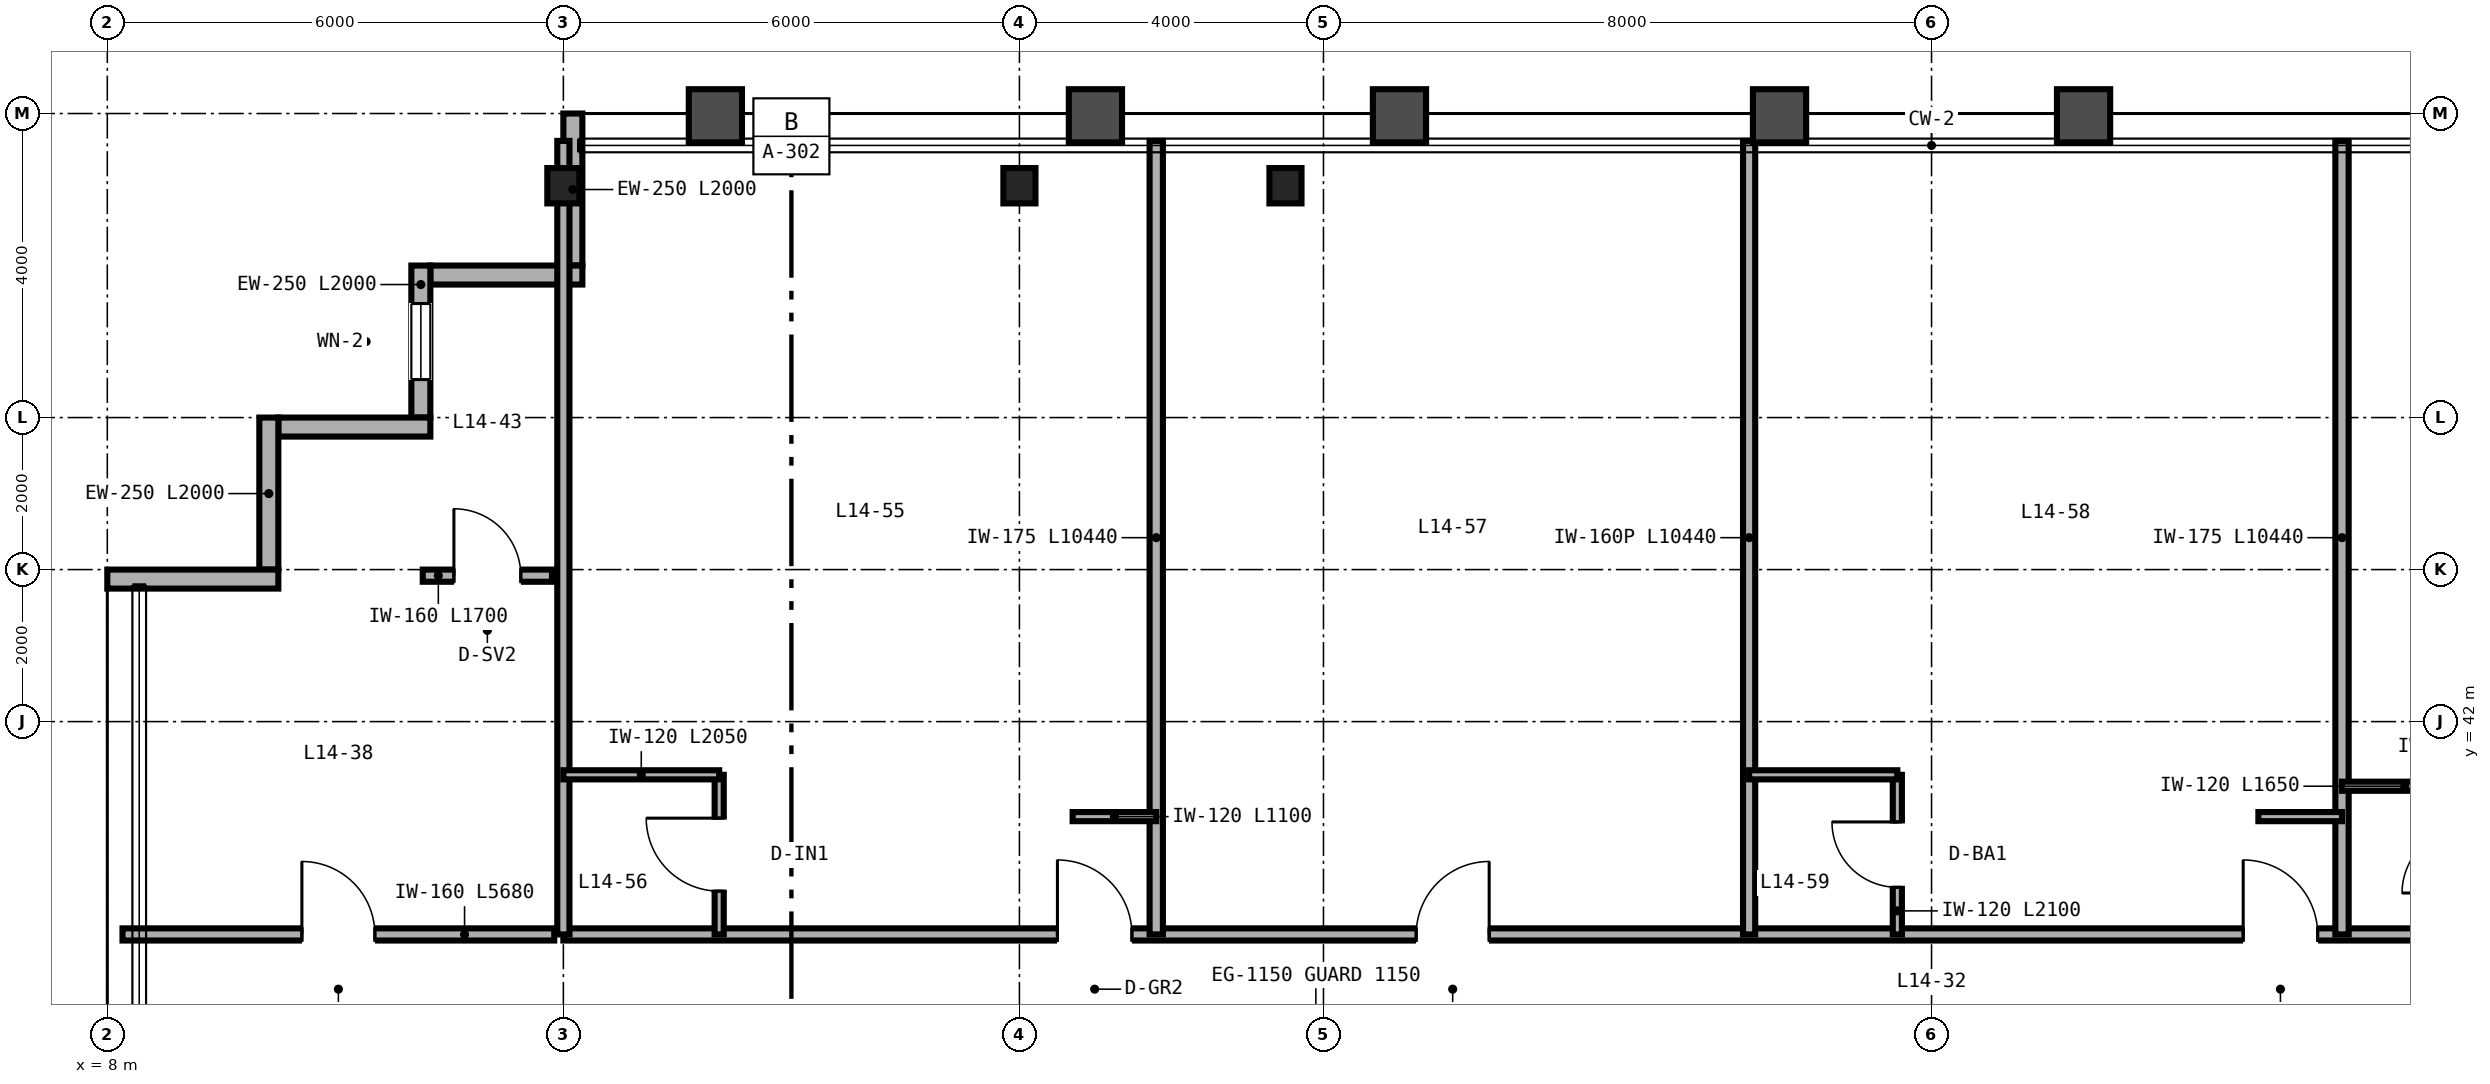
"""IFC4 building model, lengths in metres.
Left out: names, types, materials, properties, quantities, classifications, styles, units other than length and angle.
Written with IfcOpenShell. Run it as: python <this file> out.ifc"""

import sys

from ifc_helpers import new_model, si_unit, direction, frame, frame_2d, origin, origin_2d, place, context, subcontext, project, spatial, rectangle, i_section, extrude, source, transform, mapped, element, fill, save


model = new_model("IFC4")
c1 = context("Model", 3, precision=1e-05, world=origin(), true_north=direction((0.0, 1.0)))
c2 = subcontext(c1, "Body", "Model", "MODEL_VIEW")
j1 = project(units=[si_unit("LENGTHUNIT", "METRE"), si_unit("PLANEANGLEUNIT", "RADIAN")], contexts=[c1])
p1 = place(None, origin())
s1 = spatial("IfcSite", under=j1, at=p1, CompositionType="ELEMENT")
p2 = place(p1, origin())
s2 = spatial("IfcBuilding", under=s1, at=p2, CompositionType="ELEMENT")
p3 = place(p2, frame((0.0, 0.0, 60.0)))
s3 = spatial("IfcBuildingStorey", under=s2, at=p3, CompositionType="ELEMENT", Elevation=60.0)
m1 = source(origin(), c2, "Body", "SweptSolid", [
    extrude(i_section(OverallWidth=0.422, OverallDepth=0.465, WebThickness=0.045, FlangeThickness=0.073, FilletRadius=0.025, at=origin_2d()), origin(), (0.0, 0.0, 1.0), 3.35),
])
for number, where, z_axis, x_axis in (
    (1, (14.0, 49.05, 0.0), (0.0, 0.0, 1.0), (1.0, 0.0, 0.0)),
    (2, (20.0, 49.05, 0.0), (0.0, 0.0, 1.0), (1.0, 0.0, 0.0)),
    (3, (23.5, 49.05, 0.0), (0.0, 0.0, 1.0), (1.0, 0.0, 0.0)),
):
    element("IfcColumn", number, at=place(p3, frame(where, z_axis=z_axis, x_axis=x_axis)), inside=s3, PredefinedType="COLUMN", context=c2, shape_type="MappedRepresentation", body=[
        mapped(m1, transform((0.0, 0.0, 0.0), scale=1.0)),
    ])
p4 = place(p3, frame((14.125, 50.0, 0.0), z_axis=(0.0, 0.0, 1.0), x_axis=(0.0, -1.0, 0.0)))
e4 = element("IfcWall", 4, at=p4, inside=s3, PredefinedType="SOLIDWALL", context=c2, shape_type="SweptSolid", body=[
    extrude(rectangle(XDim=2.0, YDim=0.25, at=frame_2d((1.0, 0.0))), origin(), (0.0, 0.0, 1.0), 2.657),
])
p5 = place(p3, frame((14.25, 47.875, 0.0), z_axis=(0.0, 0.0, 1.0), x_axis=(-1.0, 0.0, 0.0)))
e5 = element("IfcWall", 5, at=p5, inside=s3, PredefinedType="SOLIDWALL", context=c2, shape_type="SweptSolid", body=[
    extrude(rectangle(XDim=2.0, YDim=0.25, at=frame_2d((1.0, 0.0))), origin(), (0.0, 0.0, 1.0), 3.35),
])
p6 = place(p3, frame((12.125, 48.0, 0.0), z_axis=(0.0, 0.0, 1.0), x_axis=(0.0, -1.0, 0.0)))
e6 = element("IfcWall", 6, at=p6, inside=s3, PredefinedType="SOLIDWALL", context=c2, shape_type="SweptSolid", body=[
    extrude(rectangle(XDim=2.0, YDim=0.25, at=frame_2d((1.0, 0.0))), origin(), (0.0, 0.0, 1.0), 3.35),
])
p7 = place(p6, frame((0.5, 0.0, 0.85)))
e7 = element("IfcOpeningElement", 7, at=p7, cuts=e6, PredefinedType="OPENING", context=c2, shape_type="SweptSolid", body=[
    extrude(rectangle(XDim=1.0, YDim=1.9, at=frame_2d((0.5, 0.95))), frame((0.0, 0.135, 0.0), z_axis=(0.0, -1.0, 0.0), x_axis=(1.0, 0.0, 0.0)), (0.0, 0.0, 1.0), 0.27),
])
for number, where, z_axis, x_axis in (
    (8, (12.25, 45.875, 0.0), (0.0, 0.0, 1.0), (-1.0, 0.0, 0.0)),
    (9, (10.125, 46.0, 0.0), (0.0, 0.0, 1.0), (0.0, -1.0, 0.0)),
):
    element("IfcWall", number, at=place(p3, frame(where, z_axis=z_axis, x_axis=x_axis)), inside=s3, PredefinedType="SOLIDWALL", context=c2, shape_type="SweptSolid", body=[
        extrude(rectangle(XDim=2.0, YDim=0.25, at=frame_2d((1.0, 0.0))), origin(), (0.0, 0.0, 1.0), 3.35),
    ])
p8 = place(p3, frame((10.25, 43.875, 0.0), z_axis=(0.0, 0.0, 1.0), x_axis=(-1.0, 0.0, 0.0)))
e10 = element("IfcWall", 10, at=p8, inside=s3, PredefinedType="SOLIDWALL", context=c2, shape_type="SweptSolid", body=[
    extrude(rectangle(XDim=2.25, YDim=0.25, at=frame_2d((1.125, 0.0))), origin(), (0.0, 0.0, 1.0), 3.35),
])
p9 = place(p3, frame((8.2, 39.2, 0.0), z_axis=(0.0, 0.0, 1.0), x_axis=(1.0, 0.0, 0.0)))
e11 = element("IfcWall", 11, at=p9, inside=s3, PredefinedType="PARTITIONING", context=c2, shape_type="SweptSolid", body=[
    extrude(rectangle(XDim=5.68, YDim=0.16, at=frame_2d((2.84, 0.0))), origin(), (0.0, 0.0, 1.0), 3.35),
])
p10 = place(p9, frame((2.36, 0.0, 0.0)))
e12 = element("IfcOpeningElement", 12, at=p10, cuts=e11, PredefinedType="OPENING", context=c2, shape_type="SweptSolid", body=[
    extrude(rectangle(XDim=0.96, YDim=2.15, at=frame_2d((0.48, 1.075))), frame((0.0, 0.09, 0.0), z_axis=(0.0, -1.0, 0.0), x_axis=(1.0, 0.0, 0.0)), (0.0, 0.0, 1.0), 0.18),
])
p11 = place(p3, frame((12.15, 43.92, 0.0), z_axis=(0.0, 0.0, 1.0), x_axis=(1.0, 0.0, 0.0)))
e13 = element("IfcWall", 13, at=p11, inside=s3, PredefinedType="PARTITIONING", context=c2, shape_type="SweptSolid", body=[
    extrude(rectangle(XDim=1.7, YDim=0.16, at=frame_2d((0.85, 0.0))), origin(), (0.0, 0.0, 1.0), 3.35),
])
p12 = place(p11, frame((0.41, 0.0, 0.0)))
e14 = element("IfcOpeningElement", 14, at=p12, cuts=e13, PredefinedType="OPENING", context=c2, shape_type="SweptSolid", body=[
    extrude(rectangle(XDim=0.88, YDim=2.15, at=frame_2d((0.44, 1.075))), frame((0.0, 0.09, 0.0), z_axis=(0.0, -1.0, 0.0), x_axis=(1.0, 0.0, 0.0)), (0.0, 0.0, 1.0), 0.18),
])
p13 = place(p3, frame((14.0, 39.2, 0.0), z_axis=(0.0, 0.0, 1.0), x_axis=(1.0, 0.0, 0.0)))
e15 = element("IfcWall", 15, at=p13, inside=s3, PredefinedType="PARTITIONING", context=c2, shape_type="SweptSolid", body=[
    extrude(rectangle(XDim=36.0, YDim=0.16, at=frame_2d((18.0, 0.0))), origin(), (0.0, 0.0, 1.0), 2.571),
])
p14 = place(p13, frame((6.5, 0.0, 0.0)))
e16 = element("IfcOpeningElement", 16, at=p14, cuts=e15, PredefinedType="OPENING", context=c2, shape_type="SweptSolid", body=[
    extrude(rectangle(XDim=0.98, YDim=2.2, at=frame_2d((0.49, 1.1))), frame((0.0, 0.09, 0.0), z_axis=(0.0, -1.0, 0.0), x_axis=(1.0, 0.0, 0.0)), (0.0, 0.0, 1.0), 0.18),
])
p15 = place(p13, frame((11.22, 0.0, 0.0)))
e17 = element("IfcOpeningElement", 17, at=p15, cuts=e15, PredefinedType="OPENING", context=c2, shape_type="SweptSolid", body=[
    extrude(rectangle(XDim=0.96, YDim=2.15, at=frame_2d((0.48, 1.075))), frame((0.0, 0.09, 0.0), z_axis=(0.0, -1.0, 0.0), x_axis=(1.0, 0.0, 0.0)), (0.0, 0.0, 1.0), 0.18),
])
p16 = place(p13, frame((22.1, 0.0, 0.0)))
e18 = element("IfcOpeningElement", 18, at=p16, cuts=e15, PredefinedType="OPENING", context=c2, shape_type="SweptSolid", body=[
    extrude(rectangle(XDim=0.98, YDim=2.2, at=frame_2d((0.49, 1.1))), frame((0.0, 0.09, 0.0), z_axis=(0.0, -1.0, 0.0), x_axis=(1.0, 0.0, 0.0)), (0.0, 0.0, 1.0), 0.18),
])
p17 = place(p13, frame((28.94, 0.0, 0.0)))
e19 = element("IfcOpeningElement", 19, at=p17, cuts=e15, PredefinedType="OPENING", context=c2, shape_type="SweptSolid", body=[
    extrude(rectangle(XDim=0.94, YDim=2.15, at=frame_2d((0.47, 1.075))), frame((0.0, 0.09, 0.0), z_axis=(0.0, -1.0, 0.0), x_axis=(1.0, 0.0, 0.0)), (0.0, 0.0, 1.0), 0.18),
])
p18 = place(p13, frame((34.74, 0.0, 0.0)))
e20 = element("IfcOpeningElement", 20, at=p18, cuts=e15, PredefinedType="OPENING", context=c2, shape_type="SweptSolid", body=[
    extrude(rectangle(XDim=0.94, YDim=2.15, at=frame_2d((0.47, 1.075))), frame((0.0, 0.09, 0.0), z_axis=(0.0, -1.0, 0.0), x_axis=(1.0, 0.0, 0.0)), (0.0, 0.0, 1.0), 0.18),
])
p19 = place(p3, frame((14.0, 39.2, 0.0), z_axis=(0.0, 0.0, 1.0), x_axis=(0.0, 1.0, 0.0)))
e21 = element("IfcWall", 21, at=p19, inside=s3, PredefinedType="PARTITIONING", context=c2, shape_type="SweptSolid", body=[
    extrude(rectangle(XDim=10.44, YDim=0.16, at=frame_2d((5.22, 0.0))), origin(), (0.0, 0.0, 1.0), 2.657),
])
p20 = place(p3, frame((21.8, 39.2, 0.0), z_axis=(0.0, 0.0, 1.0), x_axis=(0.0, 1.0, 0.0)))
e22 = element("IfcWall", 22, at=p20, inside=s3, PredefinedType="PARTITIONING", context=c2, shape_type="SweptSolid", body=[
    extrude(rectangle(XDim=10.44, YDim=0.175, at=frame_2d((5.22, 0.0))), origin(), (0.0, 0.0, 1.0), 2.813),
])
p21 = place(p3, frame((16.05, 39.2, 0.0), z_axis=(0.0, 0.0, 1.0), x_axis=(0.0, 1.0, 0.0)))
e23 = element("IfcWall", 23, at=p21, inside=s3, PredefinedType="PARTITIONING", context=c2, shape_type="SweptSolid", body=[
    extrude(rectangle(XDim=2.1, YDim=0.12, at=frame_2d((1.05, 0.0))), origin(), (0.0, 0.0, 1.0), 3.35),
])
p22 = place(p21, frame((0.57, 0.0, 0.0)))
e24 = element("IfcOpeningElement", 24, at=p22, cuts=e23, PredefinedType="OPENING", context=c2, shape_type="SweptSolid", body=[
    extrude(rectangle(XDim=0.96, YDim=2.15, at=frame_2d((0.48, 1.075))), frame((0.0, 0.07, 0.0), z_axis=(0.0, -1.0, 0.0), x_axis=(1.0, 0.0, 0.0)), (0.0, 0.0, 1.0), 0.14),
])
p23 = place(p3, frame((14.0, 41.3, 0.0), z_axis=(0.0, 0.0, 1.0), x_axis=(1.0, 0.0, 0.0)))
e25 = element("IfcWall", 25, at=p23, inside=s3, PredefinedType="PARTITIONING", context=c2, shape_type="SweptSolid", body=[
    extrude(rectangle(XDim=2.05, YDim=0.12, at=frame_2d((1.025, 0.0))), origin(), (0.0, 0.0, 1.0), 3.35),
])
p24 = place(p3, frame((20.7, 40.75, 0.0), z_axis=(0.0, 0.0, 1.0), x_axis=(1.0, 0.0, 0.0)))
e26 = element("IfcWall", 26, at=p24, inside=s3, PredefinedType="PARTITIONING", context=c2, shape_type="SweptSolid", body=[
    extrude(rectangle(XDim=1.1, YDim=0.12, at=frame_2d((0.55, 0.0))), origin(), (0.0, 0.0, 1.0), 3.35),
])
p25 = place(p3, frame((29.6, 39.2, 0.0), z_axis=(0.0, 0.0, 1.0), x_axis=(0.0, 1.0, 0.0)))
e27 = element("IfcWall", 27, at=p25, inside=s3, PredefinedType="PARTITIONING", context=c2, shape_type="SweptSolid", body=[
    extrude(rectangle(XDim=10.44, YDim=0.16, at=frame_2d((5.22, 0.0))), origin(), (0.0, 0.0, 1.0), 2.423),
])
p26 = place(p3, frame((37.4, 39.2, 0.0), z_axis=(0.0, 0.0, 1.0), x_axis=(0.0, 1.0, 0.0)))
e28 = element("IfcWall", 28, at=p26, inside=s3, PredefinedType="PARTITIONING", context=c2, shape_type="SweptSolid", body=[
    extrude(rectangle(XDim=10.44, YDim=0.175, at=frame_2d((5.22, 0.0))), origin(), (0.0, 0.0, 1.0), 2.423),
])
p27 = place(p3, frame((31.55, 39.2, 0.0), z_axis=(0.0, 0.0, 1.0), x_axis=(0.0, 1.0, 0.0)))
e29 = element("IfcWall", 29, at=p27, inside=s3, PredefinedType="PARTITIONING", context=c2, shape_type="SweptSolid", body=[
    extrude(rectangle(XDim=2.1, YDim=0.12, at=frame_2d((1.05, 0.0))), origin(), (0.0, 0.0, 1.0), 3.35),
])
p28 = place(p27, frame((0.62, 0.0, 0.0)))
e30 = element("IfcOpeningElement", 30, at=p28, cuts=e29, PredefinedType="OPENING", context=c2, shape_type="SweptSolid", body=[
    extrude(rectangle(XDim=0.86, YDim=2.1, at=frame_2d((0.43, 1.05))), frame((0.0, 0.07, 0.0), z_axis=(0.0, -1.0, 0.0), x_axis=(1.0, 0.0, 0.0)), (0.0, 0.0, 1.0), 0.14),
])
p29 = place(p3, frame((29.6, 41.3, 0.0), z_axis=(0.0, 0.0, 1.0), x_axis=(1.0, 0.0, 0.0)))
e31 = element("IfcWall", 31, at=p29, inside=s3, PredefinedType="PARTITIONING", context=c2, shape_type="SweptSolid", body=[
    extrude(rectangle(XDim=1.95, YDim=0.12, at=frame_2d((0.975, 0.0))), origin(), (0.0, 0.0, 1.0), 3.35),
])
p30 = place(p3, frame((36.3, 40.75, 0.0), z_axis=(0.0, 0.0, 1.0), x_axis=(1.0, 0.0, 0.0)))
e32 = element("IfcWall", 32, at=p30, inside=s3, PredefinedType="PARTITIONING", context=c2, shape_type="SweptSolid", body=[
    extrude(rectangle(XDim=1.1, YDim=0.12, at=frame_2d((0.55, 0.0))), origin(), (0.0, 0.0, 1.0), 3.35),
])
p31 = place(p3, frame((37.4, 41.15, 0.0), z_axis=(0.0, 0.0, 1.0), x_axis=(1.0, 0.0, 0.0)))
e33 = element("IfcWall", 33, at=p31, inside=s3, PredefinedType="PARTITIONING", context=c2, shape_type="SweptSolid", body=[
    extrude(rectangle(XDim=1.65, YDim=0.12, at=frame_2d((0.825, 0.0))), origin(), (0.0, 0.0, 1.0), 3.35),
])
m2 = source(origin(), c2, "Body", "SweptSolid", [
    extrude(rectangle(XDim=1.0, YDim=1.9, at=frame_2d((0.5, 0.95))), frame((0.0, 0.03, 0.0), z_axis=(0.0, -1.0, 0.0), x_axis=(1.0, 0.0, 0.0)), (0.0, 0.0, 1.0), 0.06),
])
p32 = place(p7, origin())
e34 = element("IfcWindow", 34, at=p32, inside=s3, PartitioningType="SINGLE_PANEL", PredefinedType="WINDOW", context=c2, shape_type="MappedRepresentation", body=[
    mapped(m2, transform((0.0, 0.0, 0.0), scale=1.0)),
])
fill(e7, e34)
m3 = source(origin(), c2, "Body", "SweptSolid", [
    extrude(rectangle(XDim=0.96, YDim=2.15, at=frame_2d((0.48, 1.075))), frame((0.0, 0.025, 0.0), z_axis=(0.0, -1.0, 0.0), x_axis=(1.0, 0.0, 0.0)), (0.0, 0.0, 1.0), 0.05),
])
p33 = place(p10, origin())
e35 = element("IfcDoor", 35, at=p33, inside=s3, OperationType="SINGLE_SWING_LEFT", PredefinedType="DOOR", context=c2, shape_type="MappedRepresentation", body=[
    mapped(m3, transform((0.0, 0.0, 0.0), scale=1.0)),
])
fill(e12, e35)
m4 = source(origin(), c2, "Body", "SweptSolid", [
    extrude(rectangle(XDim=0.88, YDim=2.15, at=frame_2d((0.44, 1.075))), frame((0.0, 0.025, 0.0), z_axis=(0.0, -1.0, 0.0), x_axis=(1.0, 0.0, 0.0)), (0.0, 0.0, 1.0), 0.05),
])
p34 = place(p12, origin())
e36 = element("IfcDoor", 36, at=p34, inside=s3, OperationType="SINGLE_SWING_LEFT", PredefinedType="DOOR", context=c2, shape_type="MappedRepresentation", body=[
    mapped(m4, transform((0.0, 0.0, 0.0), scale=1.0)),
])
fill(e14, e36)
p35 = place(p22, origin())
e37 = element("IfcDoor", 37, at=p35, inside=s3, OperationType="SINGLE_SWING_RIGHT", PredefinedType="DOOR", context=c2, shape_type="MappedRepresentation", body=[
    mapped(m3, transform((0.0, 0.0, 0.0), scale=1.0)),
])
fill(e24, e37)
m5 = source(origin(), c2, "Body", "SweptSolid", [
    extrude(rectangle(XDim=0.86, YDim=2.1, at=frame_2d((0.43, 1.05))), frame((0.0, 0.025, 0.0), z_axis=(0.0, -1.0, 0.0), x_axis=(1.0, 0.0, 0.0)), (0.0, 0.0, 1.0), 0.05),
])
p36 = place(p28, origin())
e38 = element("IfcDoor", 38, at=p36, inside=s3, OperationType="SINGLE_SWING_RIGHT", PredefinedType="DOOR", context=c2, shape_type="MappedRepresentation", body=[
    mapped(m5, transform((0.0, 0.0, 0.0), scale=1.0)),
])
fill(e30, e38)
m6 = source(origin(), c2, "Body", "SweptSolid", [
    extrude(rectangle(XDim=0.98, YDim=2.2, at=frame_2d((0.49, 1.1))), frame((0.0, 0.025, 0.0), z_axis=(0.0, -1.0, 0.0), x_axis=(1.0, 0.0, 0.0)), (0.0, 0.0, 1.0), 0.05),
])
p37 = place(p14, origin())
e39 = element("IfcDoor", 39, at=p37, inside=s3, OperationType="SINGLE_SWING_LEFT", PredefinedType="DOOR", context=c2, shape_type="MappedRepresentation", body=[
    mapped(m6, transform((0.0, 0.0, 0.0), scale=1.0)),
])
fill(e16, e39)
p38 = place(p15, origin())
e40 = element("IfcDoor", 40, at=p38, inside=s3, OperationType="SINGLE_SWING_RIGHT", PredefinedType="DOOR", context=c2, shape_type="MappedRepresentation", body=[
    mapped(m3, transform((0.0, 0.0, 0.0), scale=1.0)),
])
fill(e17, e40)
p39 = place(p16, origin())
e41 = element("IfcDoor", 41, at=p39, inside=s3, OperationType="SINGLE_SWING_LEFT", PredefinedType="DOOR", context=c2, shape_type="MappedRepresentation", body=[
    mapped(m6, transform((0.0, 0.0, 0.0), scale=1.0)),
])
fill(e18, e41)
save(model, sys.argv[1])
